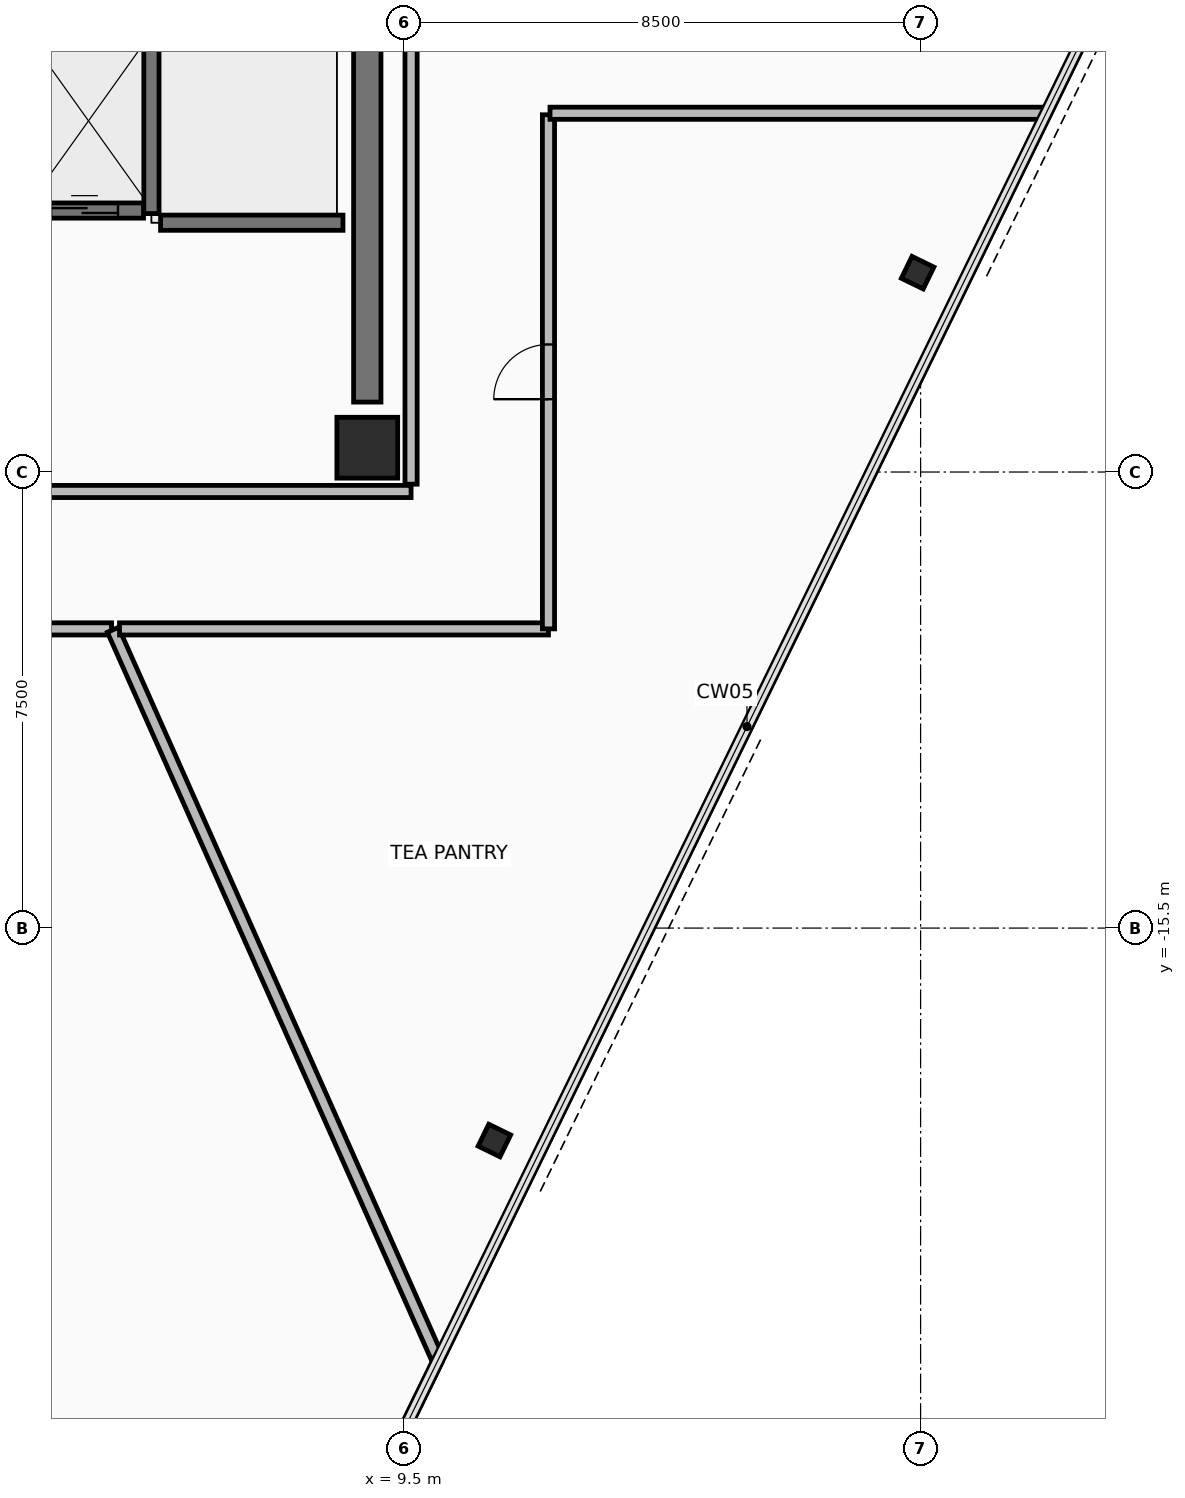
"""IFC4 building model, lengths in metres.
Left out: names, types, materials, properties, quantities, classifications, styles, units other than length and angle.
Written with IfcOpenShell. Run it as: python <this file> out.ifc"""

import sys

from ifc_helpers import new_model, si_unit, direction, frame, frame_2d, origin, origin_2d, place, context, subcontext, project, spatial, rectangle, hollow_rectangle, extrude, element, fill, save


model = new_model("IFC4")
c1 = context("Model", 3, precision=1e-05, world=origin(), true_north=direction((0.0, 1.0)))
c2 = subcontext(c1, "Body", "Model", "MODEL_VIEW")
j1 = project(units=[si_unit("LENGTHUNIT", "METRE"), si_unit("PLANEANGLEUNIT", "RADIAN")], contexts=[c1])
p1 = place(None, origin())
s1 = spatial("IfcSite", under=j1, at=p1, CompositionType="ELEMENT")
p2 = place(p1, origin())
s2 = spatial("IfcBuilding", under=s1, at=p2, CompositionType="ELEMENT")
p3 = place(p2, frame((0.0, 0.0, 271.4)))
s3 = spatial("IfcBuildingStorey", under=s2, at=p3, CompositionType="ELEMENT", Elevation=271.4)
p4 = place(p3, frame((8.9, -7.6, 0.0), z_axis=(0.0, 0.0, 1.0), x_axis=(1.0, 0.0, 0.0)))
e1 = element("IfcColumn", 1, at=p4, inside=s3, PredefinedType="COLUMN", context=c2, shape_type="SweptSolid", body=[
    extrude(rectangle(XDim=1.0, YDim=1.0, at=origin_2d()), origin(), (0.0, 0.0, 1.0), 3.6),
])
for number, where, z_axis, x_axis in (
    (2, (10.99, -18.994, 0.0), (0.0, 0.0, 1.0), (0.438, 0.899, 0.0)),
    (3, (17.951, -4.722, 0.0), (0.0, 0.0, 1.0), (0.438, 0.899, 0.0)),
):
    element("IfcColumn", number, at=place(p3, frame(where, z_axis=z_axis, x_axis=x_axis)), inside=s3, PredefinedType="COLUMN", context=c2, shape_type="SweptSolid", body=[
        extrude(hollow_rectangle(XDim=0.4, YDim=0.4, WallThickness=0.025, at=origin_2d()), origin(), (0.0, 0.0, 1.0), 3.6),
    ])
p5 = place(p3, frame((8.9, -6.85, 0.0), z_axis=(0.0, 0.0, 1.0), x_axis=(0.0, 1.0, 0.0)))
e4 = element("IfcWall", 4, at=p5, inside=s3, PredefinedType="SHEAR", context=c2, shape_type="SweptSolid", body=[
    extrude(rectangle(XDim=10.7, YDim=0.45, at=frame_2d((5.35, 0.0))), origin(), (0.0, 0.0, 1.0), 3.42),
])
p6 = place(p3, frame((-9.62, -8.32, 0.0), z_axis=(0.0, 0.0, 1.0), x_axis=(1.0, 0.0, 0.0)))
e5 = element("IfcWall", 5, at=p6, inside=s3, PredefinedType="PARTITIONING", context=c2, shape_type="SweptSolid", body=[
    extrude(rectangle(XDim=19.24, YDim=0.2, at=frame_2d((9.62, 0.0))), origin(), (0.0, 0.0, 1.0), 2.915),
])
p7 = place(p6, frame((7.37, 0.0, 0.0)))
e6 = element("IfcOpeningElement", 6, at=p7, cuts=e5, PredefinedType="OPENING", context=c2, shape_type="SweptSolid", body=[
    extrude(rectangle(XDim=0.9, YDim=2.1, at=frame_2d((0.45, 1.05))), frame((0.0, 0.11, 0.0), z_axis=(0.0, -1.0, 0.0), x_axis=(1.0, 0.0, 0.0)), (0.0, 0.0, 1.0), 0.22),
])
p8 = place(p6, frame((10.77, 0.0, 0.0)))
e7 = element("IfcOpeningElement", 7, at=p8, cuts=e5, PredefinedType="OPENING", context=c2, shape_type="SweptSolid", body=[
    extrude(rectangle(XDim=0.9, YDim=2.1, at=frame_2d((0.45, 1.05))), frame((0.0, 0.11, 0.0), z_axis=(0.0, -1.0, 0.0), x_axis=(1.0, 0.0, 0.0)), (0.0, 0.0, 1.0), 0.22),
])
p9 = place(p3, frame((9.62, -8.2, 0.0), z_axis=(0.0, 0.0, 1.0), x_axis=(0.0, 1.0, 0.0)))
e8 = element("IfcWall", 8, at=p9, inside=s3, PredefinedType="PARTITIONING", context=c2, shape_type="SweptSolid", body=[
    extrude(rectangle(XDim=16.4, YDim=0.2, at=frame_2d((8.2, 0.0))), origin(), (0.0, 0.0, 1.0), 2.915),
])
p10 = place(p9, frame((12.65, 0.0, 0.0)))
e9 = element("IfcOpeningElement", 9, at=p10, cuts=e8, PredefinedType="OPENING", context=c2, shape_type="SweptSolid", body=[
    extrude(rectangle(XDim=1.1, YDim=2.15, at=frame_2d((0.55, 1.075))), frame((0.0, 0.11, 0.0), z_axis=(0.0, -1.0, 0.0), x_axis=(1.0, 0.0, 0.0)), (0.0, 0.0, 1.0), 0.22),
])
p11 = place(p3, frame((5.35, -3.75, 0.0), z_axis=(0.0, 0.0, 1.0), x_axis=(0.0, 1.0, 0.0)))
e10 = element("IfcWall", 10, at=p11, inside=s3, PredefinedType="SHEAR", context=c2, shape_type="SweptSolid", body=[
    extrude(rectangle(XDim=7.3, YDim=0.25, at=frame_2d((3.65, 0.0))), origin(), (0.0, 0.0, 1.0), 3.42),
])
p12 = place(p3, frame((5.5, -3.9, 0.0), z_axis=(0.0, 0.0, 1.0), x_axis=(1.0, 0.0, 0.0)))
e11 = element("IfcWall", 11, at=p12, inside=s3, PredefinedType="SHEAR", context=c2, shape_type="SweptSolid", body=[
    extrude(rectangle(XDim=3.0, YDim=0.25, at=frame_2d((1.5, 0.0))), origin(), (0.0, 0.0, 1.0), 3.42),
])
p13 = place(p3, frame((3.28, -3.7, 0.0), z_axis=(0.0, 0.0, 1.0), x_axis=(1.0, 0.0, 0.0)))
e12 = element("IfcWall", 12, at=p13, inside=s3, PredefinedType="SHEAR", context=c2, shape_type="SweptSolid", body=[
    extrude(rectangle(XDim=1.94, YDim=0.25, at=frame_2d((0.97, 0.0))), origin(), (0.0, 0.0, 1.0), 3.42),
])
p14 = place(p13, frame((0.42, 0.0, 0.0)))
e13 = element("IfcOpeningElement", 13, at=p14, cuts=e12, PredefinedType="OPENING", context=c2, shape_type="SweptSolid", body=[
    extrude(rectangle(XDim=1.1, YDim=2.2, at=frame_2d((0.55, 1.1))), frame((0.0, 0.135, 0.0), z_axis=(0.0, -1.0, 0.0), x_axis=(1.0, 0.0, 0.0)), (0.0, 0.0, 1.0), 0.27),
])
p15 = place(p3, frame((-11.741, -10.58, 0.0), z_axis=(0.0, 0.0, 1.0), x_axis=(1.0, 0.0, 0.0)))
e14 = element("IfcWall", 14, at=p15, inside=s3, PredefinedType="PARTITIONING", context=c2, shape_type="SweptSolid", body=[
    extrude(rectangle(XDim=16.435, YDim=0.2, at=frame_2d((8.218, 0.0))), origin(), (0.0, 0.0, 1.0), 2.915),
])
p16 = place(p15, frame((7.793, 0.0, 0.0)))
e15 = element("IfcOpeningElement", 15, at=p16, cuts=e14, PredefinedType="OPENING", context=c2, shape_type="SweptSolid", body=[
    extrude(rectangle(XDim=0.85, YDim=2.1, at=frame_2d((0.425, 1.05))), frame((0.0, 0.11, 0.0), z_axis=(0.0, -1.0, 0.0), x_axis=(1.0, 0.0, 0.0)), (0.0, 0.0, 1.0), 0.22),
])
p17 = place(p3, frame((4.717, -10.595, 0.0), z_axis=(0.0, 0.0, 1.0), x_axis=(0.406740308305, -0.913543825769, 0.0)))
e16 = element("IfcWall", 16, at=p17, inside=s3, PredefinedType="PARTITIONING", context=c2, shape_type="SweptSolid", body=[
    extrude(rectangle(XDim=13.134, YDim=0.2, at=frame_2d((6.567, 0.0))), origin(), (0.0, 0.0, 1.0), 2.765),
])
p18 = place(p3, frame((10.059, -22.614, 0.0), z_axis=(0.0, 0.0, 1.0), x_axis=(-0.438368087018, -0.898795538643, 0.0)))
e17 = element("IfcWall", 17, at=p18, inside=s3, PredefinedType="PARTITIONING", context=c2, shape_type="SweptSolid", body=[
    extrude(rectangle(XDim=13.336, YDim=0.15, at=frame_2d((6.668, 0.0))), origin(), (0.0, 0.0, 1.0), 3.42),
])
p19 = place(p3, frame((4.825, -10.58, 0.0), z_axis=(0.0, 0.0, 1.0), x_axis=(1.0, 0.0, 0.0)))
e18 = element("IfcWall", 18, at=p19, inside=s3, PredefinedType="PARTITIONING", context=c2, shape_type="SweptSolid", body=[
    extrude(rectangle(XDim=7.054, YDim=0.2, at=frame_2d((3.527, 0.0))), origin(), (0.0, 0.0, 1.0), 2.915),
])
p20 = place(p3, frame((11.88, -10.579, 0.0), z_axis=(0.0, 0.0, 1.0), x_axis=(0.0, 1.0, 0.0)))
e19 = element("IfcWall", 19, at=p20, inside=s3, PredefinedType="PARTITIONING", context=c2, shape_type="SweptSolid", body=[
    extrude(rectangle(XDim=8.454, YDim=0.2, at=frame_2d((4.227, 0.0))), origin(), (0.0, 0.0, 1.0), 2.915),
])
p21 = place(p20, frame((3.777, 0.0, 0.0)))
e20 = element("IfcOpeningElement", 20, at=p21, cuts=e19, PredefinedType="OPENING", context=c2, shape_type="SweptSolid", body=[
    extrude(rectangle(XDim=0.9, YDim=2.1, at=frame_2d((0.45, 1.05))), frame((0.0, 0.11, 0.0), z_axis=(0.0, -1.0, 0.0), x_axis=(1.0, 0.0, 0.0)), (0.0, 0.0, 1.0), 0.22),
])
p22 = place(p3, frame((11.905, -2.1, 0.0), z_axis=(0.0, 0.0, 1.0), x_axis=(1.0, 0.0, 0.0)))
e21 = element("IfcWall", 21, at=p22, inside=s3, PredefinedType="PARTITIONING", context=c2, shape_type="SweptSolid", body=[
    extrude(rectangle(XDim=8.159, YDim=0.2, at=frame_2d((4.08, 0.0))), origin(), (0.0, 0.0, 1.0), 2.765),
])
p23 = place(p14, origin())
e22 = element("IfcDoor", 22, at=p23, inside=s3, OperationType="SLIDING_TO_LEFT", PredefinedType="DOOR", context=c2, shape_type="SweptSolid", body=[
    extrude(rectangle(XDim=1.1, YDim=2.2, at=frame_2d((0.55, 1.1))), frame((0.0, 0.025, 0.0), z_axis=(0.0, -1.0, 0.0), x_axis=(1.0, 0.0, 0.0)), (0.0, 0.0, 1.0), 0.05),
])
fill(e13, e22)
p24 = place(p21, origin())
e23 = element("IfcDoor", 23, at=p24, inside=s3, OperationType="SINGLE_SWING_LEFT", PredefinedType="DOOR", context=c2, shape_type="SweptSolid", body=[
    extrude(rectangle(XDim=0.9, YDim=2.1, at=frame_2d((0.45, 1.05))), frame((0.0, 0.025, 0.0), z_axis=(0.0, -1.0, 0.0), x_axis=(1.0, 0.0, 0.0)), (0.0, 0.0, 1.0), 0.05),
])
fill(e20, e23)
save(model, sys.argv[1])
